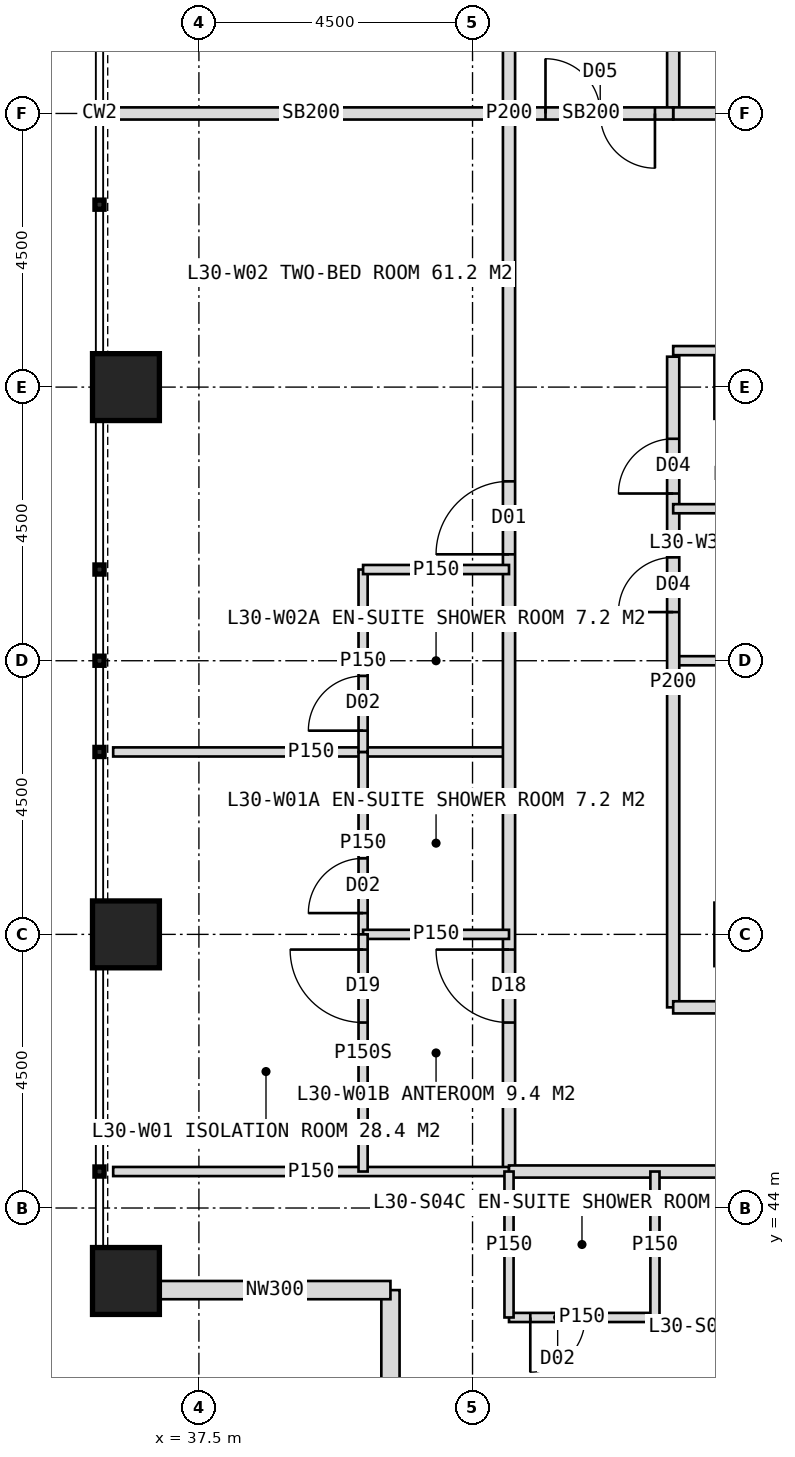
"""IFC4 building model, lengths in metres.
Left out: names, types, materials, properties, quantities, classifications, styles, units other than length and angle.
Written with IfcOpenShell. Run it as: python <this file> out.ifc"""

import sys

from ifc_helpers import new_model, si_unit, direction, frame, frame_2d, origin, origin_2d, place, context, subcontext, project, spatial, rectangle, hollow_rectangle, extrude, element, fill, save


model = new_model("IFC4")
c1 = context("Model", 3, precision=1e-05, world=origin(), true_north=direction((0.0, 1.0)))
c2 = subcontext(c1, "Body", "Model", "MODEL_VIEW")
j1 = project(units=[si_unit("LENGTHUNIT", "METRE"), si_unit("PLANEANGLEUNIT", "RADIAN")], contexts=[c1])
p1 = place(None, origin())
s1 = spatial("IfcSite", under=j1, at=p1, CompositionType="ELEMENT")
p2 = place(p1, origin())
s2 = spatial("IfcBuilding", under=s1, at=p2, CompositionType="ELEMENT")
p3 = place(p2, frame((0.0, 0.0, 128.0)))
s3 = spatial("IfcBuildingStorey", under=s2, at=p3, CompositionType="ELEMENT", Elevation=128.0)
for number, where, z_axis, x_axis in (
    (1, (36.3, 42.8, 0.0), (0.0, 0.0, 1.0), (1.0, 0.0, 0.0)),
    (2, (36.3, 48.5, 0.0), (0.0, 0.0, 1.0), (1.0, 0.0, 0.0)),
    (3, (36.3, 57.5, 0.0), (0.0, 0.0, 1.0), (1.0, 0.0, 0.0)),
):
    element("IfcColumn", number, at=place(p3, frame(where, z_axis=z_axis, x_axis=x_axis)), inside=s3, PredefinedType="COLUMN", context=c2, shape_type="SweptSolid", body=[
        extrude(hollow_rectangle(XDim=1.1, YDim=1.1, WallThickness=0.1, at=origin_2d()), origin(), (0.0, 0.0, 1.0), 4.0),
    ])
for number, where, z_axis, x_axis in (
    (4, (40.65, 38.85, 0.0), (0.0, 0.0, 1.0), (0.0, 1.0, 0.0)),
    (5, (40.65, 42.65, 0.0), (0.0, 0.0, 1.0), (-1.0, 0.0, 0.0)),
):
    element("IfcWall", number, at=place(p3, frame(where, z_axis=z_axis, x_axis=x_axis)), inside=s3, PredefinedType="ELEMENTEDWALL", context=c2, shape_type="SweptSolid", body=[
        extrude(rectangle(XDim=3.8, YDim=0.3, at=frame_2d((1.9, 0.0))), origin(), (0.0, 0.0, 1.0), 4.0),
    ])
p4 = place(p3, frame((42.6, 51.5, 0.0), z_axis=(0.0, 0.0, 1.0), x_axis=(-1.0, 0.0, 0.0)))
e6 = element("IfcWall", 6, at=p4, inside=s3, PredefinedType="PARTITIONING", context=c2, shape_type="SweptSolid", body=[
    extrude(rectangle(XDim=6.51, YDim=0.15, at=frame_2d((3.255, 0.0))), origin(), (0.0, 0.0, 1.0), 3.75),
])
p5 = place(p3, frame((42.6, 62.0, 0.0), z_axis=(0.0, 0.0, 1.0), x_axis=(-1.0, 0.0, 0.0)))
e7 = element("IfcWall", 7, at=p5, inside=s3, PredefinedType="SOLIDWALL", context=c2, shape_type="SweptSolid", body=[
    extrude(rectangle(XDim=6.51, YDim=0.2, at=frame_2d((3.255, 0.0))), origin(), (0.0, 0.0, 1.0), 2.95),
])
p6 = place(p3, frame((42.6, 44.6, 0.0), z_axis=(0.0, 0.0, 1.0), x_axis=(0.0, 1.0, 0.0)))
e8 = element("IfcWall", 8, at=p6, inside=s3, PredefinedType="PARTITIONING", context=c2, shape_type="SweptSolid", body=[
    extrude(rectangle(XDim=34.8, YDim=0.2, at=frame_2d((17.4, 0.0))), origin(), (0.0, 0.0, 1.0), 3.75),
])
p7 = place(p6, frame((2.45, 0.0, 0.0)))
e9 = element("IfcOpeningElement", 9, at=p7, cuts=e8, PredefinedType="OPENING", context=c2, shape_type="SweptSolid", body=[
    extrude(rectangle(XDim=1.2, YDim=2.2, at=frame_2d((0.6, 1.1))), frame((0.0, 0.11, 0.0), z_axis=(0.0, -1.0, 0.0), x_axis=(1.0, 0.0, 0.0)), (0.0, 0.0, 1.0), 0.22),
])
p8 = place(p6, frame((10.15, 0.0, 0.0)))
e10 = element("IfcOpeningElement", 10, at=p8, cuts=e8, PredefinedType="OPENING", context=c2, shape_type="SweptSolid", body=[
    extrude(rectangle(XDim=1.2, YDim=2.2, at=frame_2d((0.6, 1.1))), frame((0.0, 0.11, 0.0), z_axis=(0.0, -1.0, 0.0), x_axis=(1.0, 0.0, 0.0)), (0.0, 0.0, 1.0), 0.22),
])
p9 = place(p6, frame((23.45, 0.0, 0.0)))
e11 = element("IfcOpeningElement", 11, at=p9, cuts=e8, PredefinedType="OPENING", context=c2, shape_type="SweptSolid", body=[
    extrude(rectangle(XDim=1.2, YDim=2.2, at=frame_2d((0.6, 1.1))), frame((0.0, 0.11, 0.0), z_axis=(0.0, -1.0, 0.0), x_axis=(1.0, 0.0, 0.0)), (0.0, 0.0, 1.0), 0.22),
])
p10 = place(p6, frame((30.55, 0.0, 0.0)))
e12 = element("IfcOpeningElement", 12, at=p10, cuts=e8, PredefinedType="OPENING", context=c2, shape_type="SweptSolid", body=[
    extrude(rectangle(XDim=1.2, YDim=2.2, at=frame_2d((0.6, 1.1))), frame((0.0, 0.11, 0.0), z_axis=(0.0, -1.0, 0.0), x_axis=(1.0, 0.0, 0.0)), (0.0, 0.0, 1.0), 0.22),
])
p11 = place(p3, frame((42.6, 44.6, 0.0), z_axis=(0.0, 0.0, 1.0), x_axis=(-1.0, 0.0, 0.0)))
e13 = element("IfcWall", 13, at=p11, inside=s3, PredefinedType="PARTITIONING", context=c2, shape_type="SweptSolid", body=[
    extrude(rectangle(XDim=6.51, YDim=0.15, at=frame_2d((3.255, 0.0))), origin(), (0.0, 0.0, 1.0), 3.75),
])
p12 = place(p3, frame((40.2, 48.5, 0.0), z_axis=(0.0, 0.0, 1.0), x_axis=(0.0, 1.0, 0.0)))
e14 = element("IfcWall", 14, at=p12, inside=s3, PredefinedType="PARTITIONING", context=c2, shape_type="SweptSolid", body=[
    extrude(rectangle(XDim=3.0, YDim=0.15, at=frame_2d((1.5, 0.0))), origin(), (0.0, 0.0, 1.0), 3.75),
])
p13 = place(p12, frame((0.35, 0.0, 0.0)))
e15 = element("IfcOpeningElement", 15, at=p13, cuts=e14, PredefinedType="OPENING", context=c2, shape_type="SweptSolid", body=[
    extrude(rectangle(XDim=0.9, YDim=2.1, at=frame_2d((0.45, 1.05))), frame((0.0, 0.085, 0.0), z_axis=(0.0, -1.0, 0.0), x_axis=(1.0, 0.0, 0.0)), (0.0, 0.0, 1.0), 0.17),
])
p14 = place(p3, frame((42.6, 48.5, 0.0), z_axis=(0.0, 0.0, 1.0), x_axis=(-1.0, 0.0, 0.0)))
e16 = element("IfcWall", 16, at=p14, inside=s3, PredefinedType="PARTITIONING", context=c2, shape_type="SweptSolid", body=[
    extrude(rectangle(XDim=2.4, YDim=0.15, at=frame_2d((1.2, 0.0))), origin(), (0.0, 0.0, 1.0), 2.95),
])
p15 = place(p3, frame((40.2, 44.6, 0.0), z_axis=(0.0, 0.0, 1.0), x_axis=(0.0, 1.0, 0.0)))
e17 = element("IfcWall", 17, at=p15, inside=s3, PredefinedType="PARTITIONING", context=c2, shape_type="SweptSolid", body=[
    extrude(rectangle(XDim=3.9, YDim=0.15, at=frame_2d((1.95, 0.0))), origin(), (0.0, 0.0, 1.0), 3.75),
])
p16 = place(p15, frame((2.45, 0.0, 0.0)))
e18 = element("IfcOpeningElement", 18, at=p16, cuts=e17, PredefinedType="OPENING", context=c2, shape_type="SweptSolid", body=[
    extrude(rectangle(XDim=1.2, YDim=2.2, at=frame_2d((0.6, 1.1))), frame((0.0, 0.085, 0.0), z_axis=(0.0, -1.0, 0.0), x_axis=(1.0, 0.0, 0.0)), (0.0, 0.0, 1.0), 0.17),
])
p17 = place(p3, frame((40.2, 51.5, 0.0), z_axis=(0.0, 0.0, 1.0), x_axis=(0.0, 1.0, 0.0)))
e19 = element("IfcWall", 19, at=p17, inside=s3, PredefinedType="PARTITIONING", context=c2, shape_type="SweptSolid", body=[
    extrude(rectangle(XDim=3.0, YDim=0.15, at=frame_2d((1.5, 0.0))), origin(), (0.0, 0.0, 1.0), 3.75),
])
p18 = place(p17, frame((0.35, 0.0, 0.0)))
e20 = element("IfcOpeningElement", 20, at=p18, cuts=e19, PredefinedType="OPENING", context=c2, shape_type="SweptSolid", body=[
    extrude(rectangle(XDim=0.9, YDim=2.1, at=frame_2d((0.45, 1.05))), frame((0.0, 0.085, 0.0), z_axis=(0.0, -1.0, 0.0), x_axis=(1.0, 0.0, 0.0)), (0.0, 0.0, 1.0), 0.17),
])
p19 = place(p3, frame((42.6, 54.5, 0.0), z_axis=(0.0, 0.0, 1.0), x_axis=(-1.0, 0.0, 0.0)))
e21 = element("IfcWall", 21, at=p19, inside=s3, PredefinedType="PARTITIONING", context=c2, shape_type="SweptSolid", body=[
    extrude(rectangle(XDim=2.4, YDim=0.15, at=frame_2d((1.2, 0.0))), origin(), (0.0, 0.0, 1.0), 3.75),
])
p20 = place(p3, frame((51.0, 53.0, 0.0), z_axis=(0.0, 0.0, 1.0), x_axis=(-1.0, 0.0, 0.0)))
e22 = element("IfcWall", 22, at=p20, inside=s3, PredefinedType="PARTITIONING", context=c2, shape_type="SweptSolid", body=[
    extrude(rectangle(XDim=5.7, YDim=0.15, at=frame_2d((2.85, 0.0))), origin(), (0.0, 0.0, 1.0), 3.75),
])
p21 = place(p3, frame((45.3, 47.3, 0.0), z_axis=(0.0, 0.0, 1.0), x_axis=(0.0, 1.0, 0.0)))
e23 = element("IfcWall", 23, at=p21, inside=s3, PredefinedType="PARTITIONING", context=c2, shape_type="SweptSolid", body=[
    extrude(rectangle(XDim=10.7, YDim=0.2, at=frame_2d((5.35, 0.0))), origin(), (0.0, 0.0, 1.0), 3.75),
])
p22 = place(p21, frame((6.5, 0.0, 0.0)))
e24 = element("IfcOpeningElement", 24, at=p22, cuts=e23, PredefinedType="OPENING", context=c2, shape_type="SweptSolid", body=[
    extrude(rectangle(XDim=0.9, YDim=2.1, at=frame_2d((0.45, 1.05))), frame((0.0, 0.11, 0.0), z_axis=(0.0, -1.0, 0.0), x_axis=(1.0, 0.0, 0.0)), (0.0, 0.0, 1.0), 0.22),
])
p23 = place(p21, frame((8.45, 0.0, 0.0)))
e25 = element("IfcOpeningElement", 25, at=p23, cuts=e23, PredefinedType="OPENING", context=c2, shape_type="SweptSolid", body=[
    extrude(rectangle(XDim=0.9, YDim=2.1, at=frame_2d((0.45, 1.05))), frame((0.0, 0.11, 0.0), z_axis=(0.0, -1.0, 0.0), x_axis=(1.0, 0.0, 0.0)), (0.0, 0.0, 1.0), 0.22),
])
p24 = place(p3, frame((45.3, 62.0, 0.0), z_axis=(0.0, 0.0, 1.0), x_axis=(0.0, 1.0, 0.0)))
e26 = element("IfcWall", 26, at=p24, inside=s3, PredefinedType="PARTITIONING", context=c2, shape_type="SweptSolid", body=[
    extrude(rectangle(XDim=14.7, YDim=0.2, at=frame_2d((7.35, 0.0))), origin(), (0.0, 0.0, 1.0), 3.75),
])
p25 = place(p24, frame((1.45, 0.0, 0.0)))
e27 = element("IfcOpeningElement", 27, at=p25, cuts=e26, PredefinedType="OPENING", context=c2, shape_type="SweptSolid", body=[
    extrude(rectangle(XDim=1.0, YDim=2.1, at=frame_2d((0.5, 1.05))), frame((0.0, 0.11, 0.0), z_axis=(0.0, -1.0, 0.0), x_axis=(1.0, 0.0, 0.0)), (0.0, 0.0, 1.0), 0.22),
])
p26 = place(p24, frame((11.35, 0.0, 0.0)))
e28 = element("IfcOpeningElement", 28, at=p26, cuts=e26, PredefinedType="OPENING", context=c2, shape_type="SweptSolid", body=[
    extrude(rectangle(XDim=1.0, YDim=2.1, at=frame_2d((0.5, 1.05))), frame((0.0, 0.11, 0.0), z_axis=(0.0, -1.0, 0.0), x_axis=(1.0, 0.0, 0.0)), (0.0, 0.0, 1.0), 0.22),
])
p27 = place(p3, frame((51.0, 58.1, 0.0), z_axis=(0.0, 0.0, 1.0), x_axis=(-1.0, 0.0, 0.0)))
e29 = element("IfcWall", 29, at=p27, inside=s3, PredefinedType="PARTITIONING", context=c2, shape_type="SweptSolid", body=[
    extrude(rectangle(XDim=5.7, YDim=0.15, at=frame_2d((2.85, 0.0))), origin(), (0.0, 0.0, 1.0), 3.75),
])
p28 = place(p27, frame((0.6, 0.0, 0.0)))
e30 = element("IfcOpeningElement", 30, at=p28, cuts=e29, PredefinedType="OPENING", context=c2, shape_type="SweptSolid", body=[
    extrude(rectangle(XDim=0.9, YDim=2.1, at=frame_2d((0.45, 1.05))), frame((0.0, 0.085, 0.0), z_axis=(0.0, -1.0, 0.0), x_axis=(1.0, 0.0, 0.0)), (0.0, 0.0, 1.0), 0.17),
])
p29 = place(p3, frame((51.0, 62.0, 0.0), z_axis=(0.0, 0.0, 1.0), x_axis=(-1.0, 0.0, 0.0)))
e31 = element("IfcWall", 31, at=p29, inside=s3, PredefinedType="SOLIDWALL", context=c2, shape_type="SweptSolid", body=[
    extrude(rectangle(XDim=5.7, YDim=0.2, at=frame_2d((2.85, 0.0))), origin(), (0.0, 0.0, 1.0), 2.95),
])
p30 = place(p3, frame((51.0, 55.5, 0.0), z_axis=(0.0, 0.0, 1.0), x_axis=(-1.0, 0.0, 0.0)))
e32 = element("IfcWall", 32, at=p30, inside=s3, PredefinedType="PARTITIONING", context=c2, shape_type="SweptSolid", body=[
    extrude(rectangle(XDim=5.7, YDim=0.15, at=frame_2d((2.85, 0.0))), origin(), (0.0, 0.0, 1.0), 3.75),
])
p31 = place(p3, frame((77.4, 44.6, 0.0), z_axis=(0.0, 0.0, 1.0), x_axis=(-1.0, 0.0, 0.0)))
e33 = element("IfcWall", 33, at=p31, inside=s3, PredefinedType="PARTITIONING", context=c2, shape_type="SweptSolid", body=[
    extrude(rectangle(XDim=34.8, YDim=0.2, at=frame_2d((17.4, 0.0))), origin(), (0.0, 0.0, 1.0), 3.75),
])
p32 = place(p31, frame((2.45, 0.0, 0.0)))
e34 = element("IfcOpeningElement", 34, at=p32, cuts=e33, PredefinedType="OPENING", context=c2, shape_type="SweptSolid", body=[
    extrude(rectangle(XDim=1.2, YDim=2.2, at=frame_2d((0.6, 1.1))), frame((0.0, 0.11, 0.0), z_axis=(0.0, -1.0, 0.0), x_axis=(1.0, 0.0, 0.0)), (0.0, 0.0, 1.0), 0.22),
])
p33 = place(p31, frame((10.15, 0.0, 0.0)))
e35 = element("IfcOpeningElement", 35, at=p33, cuts=e33, PredefinedType="OPENING", context=c2, shape_type="SweptSolid", body=[
    extrude(rectangle(XDim=1.2, YDim=2.2, at=frame_2d((0.6, 1.1))), frame((0.0, 0.11, 0.0), z_axis=(0.0, -1.0, 0.0), x_axis=(1.0, 0.0, 0.0)), (0.0, 0.0, 1.0), 0.22),
])
p34 = place(p31, frame((20.45, 0.0, 0.0)))
e36 = element("IfcOpeningElement", 36, at=p34, cuts=e33, PredefinedType="OPENING", context=c2, shape_type="SweptSolid", body=[
    extrude(rectangle(XDim=1.2, YDim=2.2, at=frame_2d((0.6, 1.1))), frame((0.0, 0.11, 0.0), z_axis=(0.0, -1.0, 0.0), x_axis=(1.0, 0.0, 0.0)), (0.0, 0.0, 1.0), 0.22),
])
p35 = place(p31, frame((27.55, 0.0, 0.0)))
e37 = element("IfcOpeningElement", 37, at=p35, cuts=e33, PredefinedType="OPENING", context=c2, shape_type="SweptSolid", body=[
    extrude(rectangle(XDim=1.2, YDim=2.2, at=frame_2d((0.6, 1.1))), frame((0.0, 0.11, 0.0), z_axis=(0.0, -1.0, 0.0), x_axis=(1.0, 0.0, 0.0)), (0.0, 0.0, 1.0), 0.22),
])
p36 = place(p3, frame((45.0, 42.2, 0.0), z_axis=(0.0, 0.0, 1.0), x_axis=(-1.0, 0.0, 0.0)))
e38 = element("IfcWall", 38, at=p36, inside=s3, PredefinedType="PARTITIONING", context=c2, shape_type="SweptSolid", body=[
    extrude(rectangle(XDim=2.4, YDim=0.15, at=frame_2d((1.2, 0.0))), origin(), (0.0, 0.0, 1.0), 3.75),
])
p37 = place(p36, frame((1.15, 0.0, 0.0)))
e39 = element("IfcOpeningElement", 39, at=p37, cuts=e38, PredefinedType="OPENING", context=c2, shape_type="SweptSolid", body=[
    extrude(rectangle(XDim=0.9, YDim=2.1, at=frame_2d((0.45, 1.05))), frame((0.0, 0.085, 0.0), z_axis=(0.0, -1.0, 0.0), x_axis=(1.0, 0.0, 0.0)), (0.0, 0.0, 1.0), 0.17),
])
for number, where, z_axis, x_axis in (
    (40, (45.0, 44.6, 0.0), (0.0, 0.0, 1.0), (0.0, -1.0, 0.0)),
    (41, (42.6, 44.6, 0.0), (0.0, 0.0, 1.0), (0.0, -1.0, 0.0)),
):
    element("IfcWall", number, at=place(p3, frame(where, z_axis=z_axis, x_axis=x_axis)), inside=s3, PredefinedType="PARTITIONING", context=c2, shape_type="SweptSolid", body=[
        extrude(rectangle(XDim=2.4, YDim=0.15, at=frame_2d((1.2, 0.0))), origin(), (0.0, 0.0, 1.0), 3.75),
    ])
p38 = place(p3, frame((57.75, 47.3, 0.0), z_axis=(0.0, 0.0, 1.0), x_axis=(-1.0, 0.0, 0.0)))
e42 = element("IfcWall", 42, at=p38, inside=s3, PredefinedType="PARTITIONING", context=c2, shape_type="SweptSolid", body=[
    extrude(rectangle(XDim=12.45, YDim=0.2, at=frame_2d((6.225, 0.0))), origin(), (0.0, 0.0, 1.0), 3.75),
])
p39 = place(p38, frame((3.55, 0.0, 0.0)))
e43 = element("IfcOpeningElement", 43, at=p39, cuts=e42, PredefinedType="OPENING", context=c2, shape_type="SweptSolid", body=[
    extrude(rectangle(XDim=1.0, YDim=2.1, at=frame_2d((0.5, 1.05))), frame((0.0, 0.11, 0.0), z_axis=(0.0, -1.0, 0.0), x_axis=(1.0, 0.0, 0.0)), (0.0, 0.0, 1.0), 0.22),
])
p40 = place(p38, frame((8.35, 0.0, 0.0)))
e44 = element("IfcOpeningElement", 44, at=p40, cuts=e42, PredefinedType="OPENING", context=c2, shape_type="SweptSolid", body=[
    extrude(rectangle(XDim=1.0, YDim=2.1, at=frame_2d((0.5, 1.05))), frame((0.0, 0.11, 0.0), z_axis=(0.0, -1.0, 0.0), x_axis=(1.0, 0.0, 0.0)), (0.0, 0.0, 1.0), 0.22),
])
p41 = place(p3, frame((45.3, 62.0, 0.0), z_axis=(0.0, 0.0, 1.0), x_axis=(-1.0, 0.0, 0.0)))
e45 = element("IfcWall", 45, at=p41, inside=s3, PredefinedType="SOLIDWALL", context=c2, shape_type="SweptSolid", body=[
    extrude(rectangle(XDim=2.7, YDim=0.2, at=frame_2d((1.35, 0.0))), origin(), (0.0, 0.0, 1.0), 2.95),
])
p42 = place(p41, frame((0.3, 0.0, 0.0)))
e46 = element("IfcOpeningElement", 46, at=p42, cuts=e45, PredefinedType="OPENING", context=c2, shape_type="SweptSolid", body=[
    extrude(rectangle(XDim=1.8, YDim=2.2, at=frame_2d((0.9, 1.1))), frame((0.0, 0.11, 0.0), z_axis=(0.0, -1.0, 0.0), x_axis=(1.0, 0.0, 0.0)), (0.0, 0.0, 1.0), 0.22),
])
p43 = place(p16, origin())
e47 = element("IfcDoor", 47, at=p43, inside=s3, OperationType="SINGLE_SWING_RIGHT", PredefinedType="DOOR", context=c2, shape_type="SweptSolid", body=[
    extrude(rectangle(XDim=1.2, YDim=2.2, at=frame_2d((0.6, 1.1))), frame((0.0, 0.025, 0.0), z_axis=(0.0, -1.0, 0.0), x_axis=(1.0, 0.0, 0.0)), (0.0, 0.0, 1.0), 0.05),
])
fill(e18, e47)
p44 = place(p7, origin())
e48 = element("IfcDoor", 48, at=p44, inside=s3, OperationType="SINGLE_SWING_RIGHT", PredefinedType="DOOR", context=c2, shape_type="SweptSolid", body=[
    extrude(rectangle(XDim=1.2, YDim=2.2, at=frame_2d((0.6, 1.1))), frame((0.0, 0.025, 0.0), z_axis=(0.0, -1.0, 0.0), x_axis=(1.0, 0.0, 0.0)), (0.0, 0.0, 1.0), 0.05),
])
fill(e9, e48)
p45 = place(p13, origin())
e49 = element("IfcDoor", 49, at=p45, inside=s3, OperationType="SINGLE_SWING_LEFT", PredefinedType="DOOR", context=c2, shape_type="SweptSolid", body=[
    extrude(rectangle(XDim=0.9, YDim=2.1, at=frame_2d((0.45, 1.05))), frame((0.0, 0.025, 0.0), z_axis=(0.0, -1.0, 0.0), x_axis=(1.0, 0.0, 0.0)), (0.0, 0.0, 1.0), 0.05),
])
fill(e15, e49)
p46 = place(p8, origin())
e50 = element("IfcDoor", 50, at=p46, inside=s3, OperationType="SINGLE_SWING_LEFT", PredefinedType="DOOR", context=c2, shape_type="SweptSolid", body=[
    extrude(rectangle(XDim=1.2, YDim=2.2, at=frame_2d((0.6, 1.1))), frame((0.0, 0.025, 0.0), z_axis=(0.0, -1.0, 0.0), x_axis=(1.0, 0.0, 0.0)), (0.0, 0.0, 1.0), 0.05),
])
fill(e10, e50)
p47 = place(p18, origin())
e51 = element("IfcDoor", 51, at=p47, inside=s3, OperationType="SINGLE_SWING_LEFT", PredefinedType="DOOR", context=c2, shape_type="SweptSolid", body=[
    extrude(rectangle(XDim=0.9, YDim=2.1, at=frame_2d((0.45, 1.05))), frame((0.0, 0.025, 0.0), z_axis=(0.0, -1.0, 0.0), x_axis=(1.0, 0.0, 0.0)), (0.0, 0.0, 1.0), 0.05),
])
fill(e20, e51)
p48 = place(p22, origin())
e52 = element("IfcDoor", 52, at=p48, inside=s3, OperationType="SINGLE_SWING_LEFT", PredefinedType="DOOR", context=c2, shape_type="SweptSolid", body=[
    extrude(rectangle(XDim=0.9, YDim=2.1, at=frame_2d((0.45, 1.05))), frame((0.0, 0.025, 0.0), z_axis=(0.0, -1.0, 0.0), x_axis=(1.0, 0.0, 0.0)), (0.0, 0.0, 1.0), 0.05),
])
fill(e24, e52)
p49 = place(p23, origin())
e53 = element("IfcDoor", 53, at=p49, inside=s3, OperationType="SINGLE_SWING_LEFT", PredefinedType="DOOR", context=c2, shape_type="SweptSolid", body=[
    extrude(rectangle(XDim=0.9, YDim=2.1, at=frame_2d((0.45, 1.05))), frame((0.0, 0.025, 0.0), z_axis=(0.0, -1.0, 0.0), x_axis=(1.0, 0.0, 0.0)), (0.0, 0.0, 1.0), 0.05),
])
fill(e25, e53)
p50 = place(p37, origin())
e54 = element("IfcDoor", 54, at=p50, inside=s3, OperationType="SINGLE_SWING_RIGHT", PredefinedType="DOOR", context=c2, shape_type="SweptSolid", body=[
    extrude(rectangle(XDim=0.9, YDim=2.1, at=frame_2d((0.45, 1.05))), frame((0.0, 0.025, 0.0), z_axis=(0.0, -1.0, 0.0), x_axis=(1.0, 0.0, 0.0)), (0.0, 0.0, 1.0), 0.05),
])
fill(e39, e54)
p51 = place(p42, origin())
e55 = element("IfcDoor", 55, at=p51, inside=s3, OperationType="DOUBLE_DOOR_DOUBLE_SWING", PredefinedType="DOOR", context=c2, shape_type="SweptSolid", body=[
    extrude(rectangle(XDim=1.8, YDim=2.2, at=frame_2d((0.9, 1.1))), frame((0.0, 0.025, 0.0), z_axis=(0.0, -1.0, 0.0), x_axis=(1.0, 0.0, 0.0)), (0.0, 0.0, 1.0), 0.05),
])
fill(e46, e55)
save(model, sys.argv[1])
